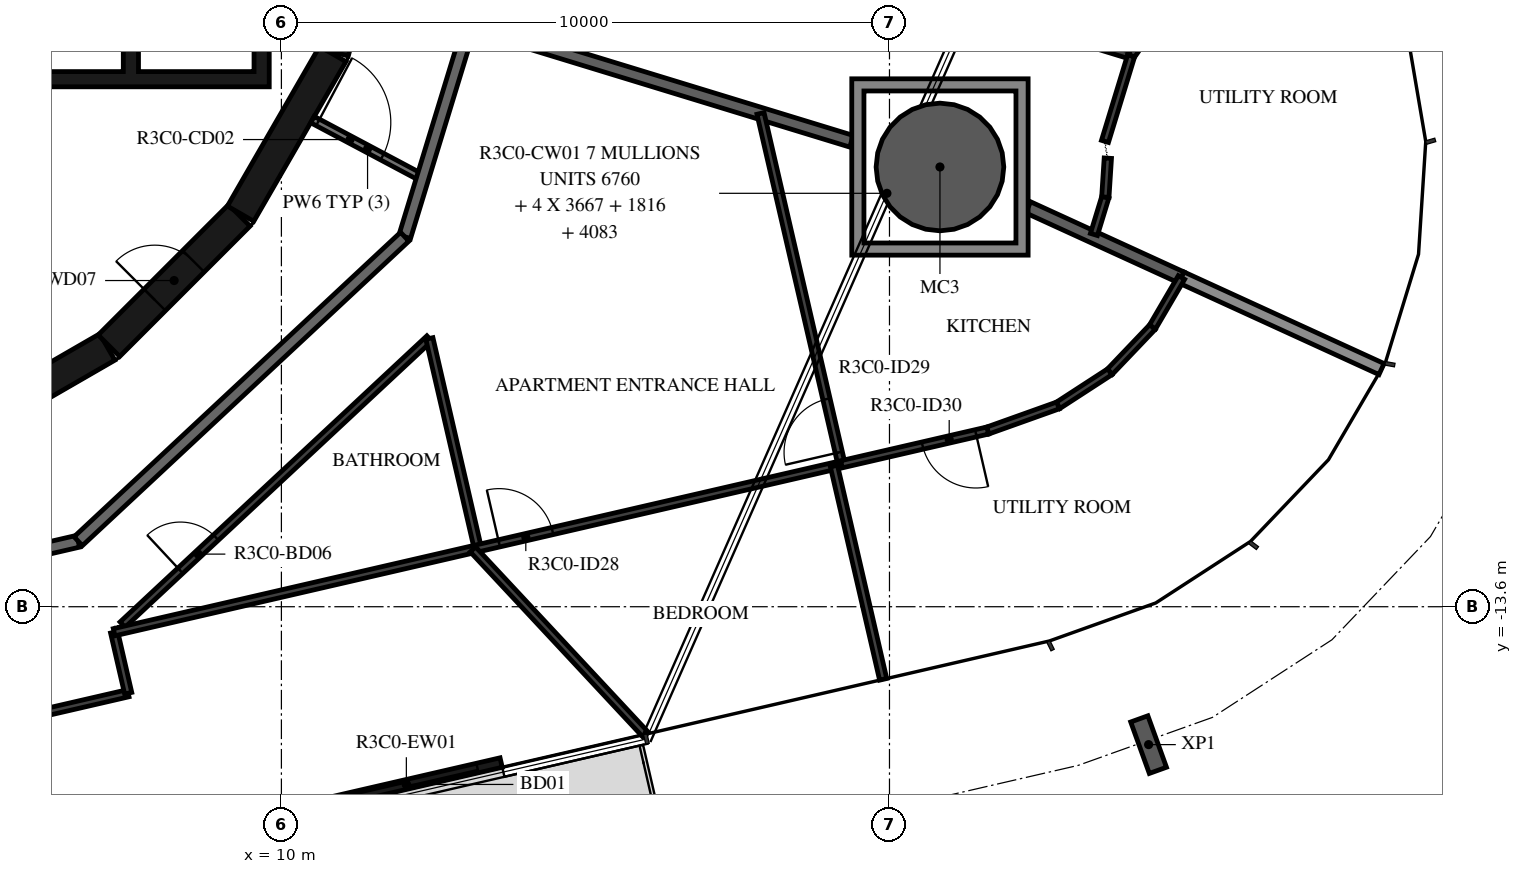
"""IFC4 building model, lengths in metres.
Left out: names, types, materials, properties, quantities, classifications, styles, units other than length and angle.
Written with IfcOpenShell. Run it as: python <this file> out.ifc"""

import sys

from ifc_helpers import new_model, si_unit, direction, frame, frame_2d, origin, origin_2d, place, context, subcontext, project, spatial, polyline, rectangle, hollow_circle, i_section, outline, extrude, element, fill, save


model = new_model("IFC4")
c1 = context("Model", 3, precision=1e-05, world=origin(), true_north=direction((0.0, 1.0)))
c2 = subcontext(c1, "Body", "Model", "MODEL_VIEW")
j1 = project(units=[si_unit("LENGTHUNIT", "METRE"), si_unit("PLANEANGLEUNIT", "RADIAN")], contexts=[c1])
p1 = place(None, origin())
s1 = spatial("IfcSite", under=j1, at=p1, CompositionType="ELEMENT")
p2 = place(p1, origin())
s2 = spatial("IfcBuilding", under=s1, at=p2, CompositionType="ELEMENT")
p3 = place(p2, frame((0.0, 0.0, 134.4)))
s3 = spatial("IfcBuildingStorey", under=s2, at=p3, CompositionType="ELEMENT", Elevation=134.4)
p4 = place(p3, frame((20.83, -6.368, -0.38), z_axis=(0.0, 0.0, 1.0), x_axis=(1.0, 0.0, 0.0)))
e1 = element("IfcColumn", 1, at=p4, inside=s3, PredefinedType="COLUMN", context=c2, shape_type="SweptSolid", body=[
    extrude(hollow_circle(Radius=1.05, WallThickness=0.05, at=origin_2d()), origin(), (0.0, 0.0, 1.0), 3.5),
])
p5 = place(p3, frame((24.261, -15.868, -0.38), z_axis=(0.0, 0.0, 1.0), x_axis=(-0.940523325903, -0.339729117728, 0.0)))
e2 = element("IfcColumn", 2, at=p5, inside=s3, PredefinedType="COLUMN", context=c2, shape_type="SweptSolid", body=[
    extrude(i_section(OverallWidth=0.3, OverallDepth=0.9, WebThickness=0.019, FlangeThickness=0.035, FilletRadius=0.03, at=origin_2d()), origin(), (0.0, 0.0, 1.0), 3.5),
])
p6 = place(p3, frame((10.496, -16.883, 0.0), z_axis=(0.0, 0.0, 1.0), x_axis=(0.974364187477, 0.224976510247, 0.0)))
e3 = element("IfcWall", 3, at=p6, inside=s3, PredefinedType="STANDARD", context=c2, shape_type="SweptSolid", body=[
    extrude(rectangle(XDim=3.2, YDim=0.16, at=frame_2d((1.6, 0.0))), origin(), (0.0, 0.0, 1.0), 3.12),
])
p7 = place(p6, frame((0.4, 0.0, 0.0)))
e4 = element("IfcOpeningElement", 4, at=p7, cuts=e3, PredefinedType="OPENING", context=c2, shape_type="SweptSolid", body=[
    extrude(rectangle(XDim=2.4, YDim=2.4, at=frame_2d((1.2, 1.2))), frame((0.0, 0.09, 0.0), z_axis=(0.0, -1.0, 0.0), x_axis=(1.0, 0.0, 0.0)), (0.0, 0.0, 1.0), 0.18),
])
p8 = place(p3, frame((4.51, -10.845, 0.0), z_axis=(0.0, 0.0, 1.0), x_axis=(0.865975092491, 0.500087131594, 0.0)))
e5 = element("IfcWall", 5, at=p8, inside=s3, PredefinedType="SHEAR", context=c2, shape_type="SweptSolid", body=[
    extrude(rectangle(XDim=3.033, YDim=0.5, at=frame_2d((1.516, 0.0))), origin(), (0.0, 0.0, 1.0), 3.12),
])
p9 = place(p3, frame((7.164, -9.308, 0.0), z_axis=(0.0, 0.0, 1.0), x_axis=(0.707106781187, 0.707106781187, 0.0)))
e6 = element("IfcWall", 6, at=p9, inside=s3, PredefinedType="SHEAR", context=c2, shape_type="SweptSolid", body=[
    extrude(rectangle(XDim=3.032, YDim=0.5, at=frame_2d((1.516, 0.0))), origin(), (0.0, 0.0, 1.0), 3.12),
])
p10 = place(p9, frame((1.066, 0.0, 0.0)))
e7 = element("IfcOpeningElement", 7, at=p10, cuts=e6, PredefinedType="OPENING", context=c2, shape_type="SweptSolid", body=[
    extrude(rectangle(XDim=0.9, YDim=2.1, at=frame_2d((0.45, 1.05))), frame((0.0, 0.26, 0.0), z_axis=(0.0, -1.0, 0.0), x_axis=(1.0, 0.0, 0.0)), (0.0, 0.0, 1.0), 0.52),
])
for number, where, z_axis, x_axis in (
    (8, (9.329, -7.137, 0.0), (0.0, 0.0, 1.0), (0.5, 0.866, 0.0)),
    (9, (10.858, -4.479, 0.0), (0.0, 0.0, 1.0), (0.259, 0.966, 0.0)),
):
    element("IfcWall", number, at=place(p3, frame(where, z_axis=z_axis, x_axis=x_axis)), inside=s3, PredefinedType="SHEAR", context=c2, shape_type="SweptSolid", body=[
        extrude(rectangle(XDim=3.033, YDim=0.5, at=frame_2d((1.516, 0.0))), origin(), (0.0, 0.0, 1.0), 3.12),
    ])
p11 = place(p3, origin())
e10 = element("IfcWall", 10, at=p11, inside=s3, PredefinedType="SHEAR", context=c2, shape_type="SweptSolid", body=[
    extrude(outline(polyline([(9.8, -5.05), (9.8, -4.8), (9.8, -1.9), (9.55, -1.9), (9.55, -4.8), (7.65, -4.8), (7.65, -1.9), (7.4, -1.9), (7.4, -4.8), (5.5, -4.8), (5.5, -1.9), (5.25, -1.9), (5.25, -4.8), (3.35, -4.8), (3.35, -1.9), (3.1, -1.9), (3.1, -4.8), (-5.25, -4.8), (-5.25, -1.9), (-5.5, -1.9), (-5.5, -4.8), (-7.4, -4.8), (-7.4, -1.9), (-7.65, -1.9), (-7.65, -4.8), (-9.55, -4.8), (-9.55, -1.9), (-9.8, -1.9), (-9.8, -4.8), (-9.8, -5.05), (9.8, -5.05)])), origin(), (0.0, 0.0, 1.0), 3.12),
])
p12 = place(p3, frame((10.511, -5.589, 0.0), z_axis=(0.0, 0.0, 1.0), x_axis=(0.882987820808, -0.469395897196, 0.0)))
e11 = element("IfcWall", 11, at=p12, inside=s3, PredefinedType="PARTITIONING", context=c2, shape_type="SweptSolid", body=[
    extrude(rectangle(XDim=2.052, YDim=0.12, at=frame_2d((1.026, 0.0))), origin(), (0.0, 0.0, 1.0), 3.12),
])
p13 = place(p12, frame((0.1, 0.0, 0.0)))
e12 = element("IfcOpeningElement", 12, at=p13, cuts=e11, PredefinedType="OPENING", context=c2, shape_type="SweptSolid", body=[
    extrude(rectangle(XDim=1.2, YDim=2.1, at=frame_2d((0.6, 1.05))), frame((0.0, 0.07, 0.0), z_axis=(0.0, -1.0, 0.0), x_axis=(1.0, 0.0, 0.0)), (0.0, 0.0, 1.0), 0.14),
])
p14 = place(p3, frame((12.028, -7.516, 0.0), z_axis=(0.0, 0.0, 1.0), x_axis=(0.292365533182, 0.956306642771, 0.0)))
e13 = element("IfcWall", 13, at=p14, inside=s3, PredefinedType="STANDARD", context=c2, shape_type="SweptSolid", body=[
    extrude(rectangle(XDim=7.342, YDim=0.2, at=frame_2d((3.671, 0.0))), origin(), (0.0, 0.0, 1.0), 3.12),
])
p15 = place(p3, frame((-0.495, -14.175, 0.0), z_axis=(0.0, 0.0, 1.0), x_axis=(0.974376622151, 0.224922649383, 0.0)))
e14 = element("IfcWall", 14, at=p15, inside=s3, PredefinedType="STANDARD", context=c2, shape_type="SweptSolid", body=[
    extrude(rectangle(XDim=7.342, YDim=0.2, at=frame_2d((3.671, 0.0))), origin(), (0.0, 0.0, 1.0), 3.12),
])
p16 = place(p15, frame((0.2, 0.0, 0.0)))
e15 = element("IfcOpeningElement", 15, at=p16, cuts=e14, PredefinedType="OPENING", context=c2, shape_type="SweptSolid", body=[
    extrude(rectangle(XDim=1.0, YDim=2.1, at=frame_2d((0.5, 1.05))), frame((0.0, 0.11, 0.0), z_axis=(0.0, -1.0, 0.0), x_axis=(1.0, 0.0, 0.0)), (0.0, 0.0, 1.0), 0.22),
])
p17 = place(p3, frame((6.659, -12.523, 0.0), z_axis=(0.0, 0.0, 1.0), x_axis=(0.731350455479, 0.682001841105, 0.0)))
e16 = element("IfcWall", 16, at=p17, inside=s3, PredefinedType="STANDARD", context=c2, shape_type="SweptSolid", body=[
    extrude(rectangle(XDim=7.342, YDim=0.2, at=frame_2d((3.671, 0.0))), origin(), (0.0, 0.0, 1.0), 3.12),
])
p18 = place(p3, frame((13.095, -4.026, 0.0), z_axis=(0.0, 0.0, 1.0), x_axis=(0.956303942966, -0.292374363904, 0.0)))
e17 = element("IfcWall", 17, at=p18, inside=s3, PredefinedType="STANDARD", context=c2, shape_type="SweptSolid", body=[
    extrude(rectangle(XDim=6.567, YDim=0.2, at=frame_2d((3.284, 0.0))), origin(), (0.0, 0.0, 1.0), 3.12),
])
p19 = place(p3, frame((22.28, -7.032, 0.0), z_axis=(0.0, 0.0, 1.0), x_axis=(0.909302252994, -0.416136291016, 0.0)))
e18 = element("IfcWall", 18, at=p19, inside=s3, PredefinedType="STANDARD", context=c2, shape_type="SweptSolid", body=[
    extrude(rectangle(XDim=2.773, YDim=0.2, at=frame_2d((1.387, 0.0))), origin(), (0.0, 0.0, 1.0), 3.12),
])
p20 = place(p3, frame((24.802, -8.186, 0.0), z_axis=(0.0, 0.0, 1.0), x_axis=(0.909307466213, -0.416124899387, 0.0)))
e19 = element("IfcWall", 19, at=p20, inside=s3, PredefinedType="STANDARD", context=c2, shape_type="SweptSolid", body=[
    extrude(rectangle(XDim=3.618, YDim=0.2, at=frame_2d((1.809, 0.0))), origin(), (0.0, 0.0, 1.0), 2.73),
])
p21 = place(p3, frame((23.975, -4.537, 0.0), z_axis=(0.0, 0.0, 1.0), x_axis=(-0.956300480156, 0.292385689892, 0.0)))
e20 = element("IfcWall", 20, at=p21, inside=s3, PredefinedType="PARTITIONING", context=c2, shape_type="SweptSolid", body=[
    extrude(rectangle(XDim=9.054, YDim=0.12, at=frame_2d((4.527, 0.0))), origin(), (0.0, 0.0, 1.0), 3.12),
])
p22 = place(p21, frame((2.998, 0.0, 0.0)))
e21 = element("IfcOpeningElement", 21, at=p22, cuts=e20, PredefinedType="OPENING", context=c2, shape_type="SweptSolid", body=[
    extrude(rectangle(XDim=0.8, YDim=2.1, at=frame_2d((0.4, 1.05))), frame((0.0, 0.07, 0.0), z_axis=(0.0, -1.0, 0.0), x_axis=(1.0, 0.0, 0.0)), (0.0, 0.0, 1.0), 0.14),
])
for number, where, z_axis, x_axis in (
    (22, (23.362, -7.478, 0.0), (0.0, 0.0, 1.0), (0.293, 0.956, 0.0)),
    (23, (23.55, -6.864, 0.0), (0.0, 0.0, 1.0), (0.064, 0.998, 0.0)),
):
    element("IfcWall", number, at=place(p3, frame(where, z_axis=z_axis, x_axis=x_axis)), inside=s3, PredefinedType="PARTITIONING", context=c2, shape_type="SweptSolid", body=[
        extrude(rectangle(XDim=0.642, YDim=0.12, at=frame_2d((0.321, 0.0))), origin(), (0.0, 0.0, 1.0), 3.12),
    ])
p23 = place(p3, frame((23.544, -5.948, 0.0), z_axis=(0.0, 0.0, 1.0), x_axis=(0.292386782861, 0.956300145983, 0.0)))
e24 = element("IfcWall", 24, at=p23, inside=s3, PredefinedType="PARTITIONING", context=c2, shape_type="SweptSolid", body=[
    extrude(rectangle(XDim=1.475, YDim=0.12, at=frame_2d((0.737, 0.0))), origin(), (0.0, 0.0, 1.0), 3.12),
])
p24 = place(p3, frame((26.593, -0.818, 0.0), z_axis=(0.0, 0.0, 1.0), x_axis=(-0.575629018128, -0.817710971853, 0.0)))
e25 = element("IfcWall", 25, at=p24, inside=s3, PredefinedType="PARTITIONING", context=c2, shape_type="SweptSolid", body=[
    extrude(rectangle(XDim=4.548, YDim=0.12, at=frame_2d((2.274, 0.0))), origin(), (0.0, 0.0, 1.0), 3.12),
])
p25 = place(p24, frame((0.2, 0.0, 0.0)))
e26 = element("IfcOpeningElement", 26, at=p25, cuts=e25, PredefinedType="OPENING", context=c2, shape_type="SweptSolid", body=[
    extrude(rectangle(XDim=0.9, YDim=2.1, at=frame_2d((0.45, 1.05))), frame((0.0, 0.07, 0.0), z_axis=(0.0, -1.0, 0.0), x_axis=(1.0, 0.0, 0.0)), (0.0, 0.0, 1.0), 0.14),
])
p26 = place(p3, frame((4.265, -15.765, 0.0), z_axis=(0.0, 0.0, 1.0), x_axis=(0.974382467056, 0.22489732745, 0.0)))
e27 = element("IfcWall", 27, at=p26, inside=s3, PredefinedType="PARTITIONING", context=c2, shape_type="SweptSolid", body=[
    extrude(rectangle(XDim=3.3, YDim=0.12, at=frame_2d((1.65, 0.0))), origin(), (0.0, 0.0, 1.0), 3.12),
])
p27 = place(p3, frame((7.481, -15.022, 0.0), z_axis=(0.0, 0.0, 1.0), x_axis=(-0.225084689316, 0.974339203068, 0.0)))
e28 = element("IfcWall", 28, at=p27, inside=s3, PredefinedType="PARTITIONING", context=c2, shape_type="SweptSolid", body=[
    extrude(rectangle(XDim=1.029, YDim=0.12, at=frame_2d((0.515, 0.0))), origin(), (0.0, 0.0, 1.0), 3.12),
])
p28 = place(p3, frame((7.388, -13.894, 0.0), z_axis=(0.0, 0.0, 1.0), x_axis=(0.731339966659, 0.682013088707, 0.0)))
e29 = element("IfcWall", 29, at=p28, inside=s3, PredefinedType="PARTITIONING", context=c2, shape_type="SweptSolid", body=[
    extrude(rectangle(XDim=6.899, YDim=0.12, at=frame_2d((3.45, 0.0))), origin(), (0.0, 0.0, 1.0), 3.12),
])
p29 = place(p28, frame((1.3, 0.0, 0.0)))
e30 = element("IfcOpeningElement", 30, at=p29, cuts=e29, PredefinedType="OPENING", context=c2, shape_type="SweptSolid", body=[
    extrude(rectangle(XDim=0.8, YDim=2.1, at=frame_2d((0.4, 1.05))), frame((0.0, 0.07, 0.0), z_axis=(0.0, -1.0, 0.0), x_axis=(1.0, 0.0, 0.0)), (0.0, 0.0, 1.0), 0.14),
])
p30 = place(p3, frame((12.434, -9.189, 0.0), z_axis=(0.0, 0.0, 1.0), x_axis=(0.224924972887, -0.974376085796, 0.0)))
e31 = element("IfcWall", 31, at=p30, inside=s3, PredefinedType="PARTITIONING", context=c2, shape_type="SweptSolid", body=[
    extrude(rectangle(XDim=3.541, YDim=0.12, at=frame_2d((1.771, 0.0))), origin(), (0.0, 0.0, 1.0), 3.12),
])
p31 = place(p3, frame((7.249, -14.02, 0.0), z_axis=(0.0, 0.0, 1.0), x_axis=(0.974369514697, 0.224953437023, 0.0)))
e32 = element("IfcWall", 32, at=p31, inside=s3, PredefinedType="PARTITIONING", context=c2, shape_type="SweptSolid", body=[
    extrude(rectangle(XDim=12.149, YDim=0.12, at=frame_2d((6.074, 0.0))), origin(), (0.0, 0.0, 1.0), 3.12),
])
p32 = place(p31, frame((6.498, 0.0, 0.0)))
e33 = element("IfcOpeningElement", 33, at=p32, cuts=e32, PredefinedType="OPENING", context=c2, shape_type="SweptSolid", body=[
    extrude(rectangle(XDim=0.9, YDim=2.1, at=frame_2d((0.45, 1.05))), frame((0.0, 0.07, 0.0), z_axis=(0.0, -1.0, 0.0), x_axis=(1.0, 0.0, 0.0)), (0.0, 0.0, 1.0), 0.14),
])
p33 = place(p3, frame((19.211, -11.258, 0.0), z_axis=(0.0, 0.0, 1.0), x_axis=(-0.22499500936, 0.974359915926, 0.0)))
e34 = element("IfcWall", 34, at=p33, inside=s3, PredefinedType="PARTITIONING", context=c2, shape_type="SweptSolid", body=[
    extrude(rectangle(XDim=5.921, YDim=0.12, at=frame_2d((2.961, 0.0))), origin(), (0.0, 0.0, 1.0), 3.12),
])
p34 = place(p33, frame((0.2, 0.0, 0.0)))
e35 = element("IfcOpeningElement", 35, at=p34, cuts=e34, PredefinedType="OPENING", context=c2, shape_type="SweptSolid", body=[
    extrude(rectangle(XDim=0.9, YDim=2.1, at=frame_2d((0.45, 1.05))), frame((0.0, 0.07, 0.0), z_axis=(0.0, -1.0, 0.0), x_axis=(1.0, 0.0, 0.0)), (0.0, 0.0, 1.0), 0.14),
])
p35 = place(p3, frame((15.985, -15.698, 0.0), z_axis=(0.0, 0.0, 1.0), x_axis=(-0.681979185924, 0.731371581322, 0.0)))
e36 = element("IfcWall", 36, at=p35, inside=s3, PredefinedType="PARTITIONING", context=c2, shape_type="SweptSolid", body=[
    extrude(rectangle(XDim=4.157, YDim=0.12, at=frame_2d((2.079, 0.0))), origin(), (0.0, 0.0, 1.0), 3.12),
])
p36 = place(p3, frame((19.896, -14.794, 0.0), z_axis=(0.0, 0.0, 1.0), x_axis=(-0.224958568294, 0.974368330023, 0.0)))
e37 = element("IfcWall", 37, at=p36, inside=s3, PredefinedType="PARTITIONING", context=c2, shape_type="SweptSolid", body=[
    extrude(rectangle(XDim=3.6, YDim=0.12, at=frame_2d((1.8, 0.0))), origin(), (0.0, 0.0, 1.0), 3.12),
])
p37 = place(p3, frame((24.802, -8.186, 0.0), z_axis=(0.0, 0.0, 1.0), x_axis=(-0.505043103481, -0.863094122113, 0.0)))
e38 = element("IfcWall", 38, at=p37, inside=s3, PredefinedType="PARTITIONING", context=c2, shape_type="SweptSolid", body=[
    extrude(rectangle(XDim=0.945, YDim=0.12, at=frame_2d((0.473, 0.0))), origin(), (0.0, 0.0, 1.0), 3.12),
])
for number, where, z_axis, x_axis in (
    (39, (24.324, -9.002, 0.0), (0.0, 0.0, 1.0), (-0.69, -0.723, 0.0)),
    (40, (23.623, -9.737, 0.0), (0.0, 0.0, 1.0), (-0.839, -0.545, 0.0)),
):
    element("IfcWall", number, at=place(p3, frame(where, z_axis=z_axis, x_axis=x_axis)), inside=s3, PredefinedType="PARTITIONING", context=c2, shape_type="SweptSolid", body=[
        extrude(rectangle(XDim=1.016, YDim=0.12, at=frame_2d((0.508, 0.0))), origin(), (0.0, 0.0, 1.0), 3.12),
    ])
p38 = place(p3, frame((22.771, -10.29, 0.0), z_axis=(0.0, 0.0, 1.0), x_axis=(-0.941701391526, -0.336449831623, 0.0)))
e41 = element("IfcWall", 41, at=p38, inside=s3, PredefinedType="PARTITIONING", context=c2, shape_type="SweptSolid", body=[
    extrude(rectangle(XDim=1.227, YDim=0.12, at=frame_2d((0.614, 0.0))), origin(), (0.0, 0.0, 1.0), 3.12),
])
p39 = place(p3, frame((21.615, -10.703, 0.0), z_axis=(0.0, 0.0, 1.0), x_axis=(-0.974361171506, -0.224989571893, 0.0)))
e42 = element("IfcWall", 42, at=p39, inside=s3, PredefinedType="PARTITIONING", context=c2, shape_type="SweptSolid", body=[
    extrude(rectangle(XDim=2.468, YDim=0.12, at=frame_2d((1.234, 0.0))), origin(), (0.0, 0.0, 1.0), 3.12),
])
p40 = place(p39, frame((0.2, 0.0, 0.0)))
e43 = element("IfcOpeningElement", 43, at=p40, cuts=e42, PredefinedType="OPENING", context=c2, shape_type="SweptSolid", body=[
    extrude(rectangle(XDim=0.9, YDim=2.1, at=frame_2d((0.45, 1.05))), frame((0.0, 0.07, 0.0), z_axis=(0.0, -1.0, 0.0), x_axis=(1.0, 0.0, 0.0)), (0.0, 0.0, 1.0), 0.14),
])
p41 = place(p3, origin())
e44 = element("IfcWall", 44, at=p41, inside=s3, PredefinedType="STANDARD", context=c2, shape_type="SweptSolid", body=[
    extrude(outline(polyline([(22.28, -4.918), (22.28, -7.818), (19.38, -7.818), (19.38, -4.918), (22.28, -4.918)]), holes=[polyline([(19.58, -7.618), (22.08, -7.618), (22.08, -5.118), (19.58, -5.118), (19.58, -7.618)])]), origin(), (0.0, 0.0, 1.0), 3.12),
])
p42 = place(p7, origin())
e45 = element("IfcDoor", 45, at=p42, inside=s3, OperationType="DOUBLE_DOOR_SLIDING", PredefinedType="DOOR", context=c2, shape_type="SweptSolid", body=[
    extrude(rectangle(XDim=2.4, YDim=2.4, at=frame_2d((1.2, 1.2))), frame((0.0, 0.025, 0.0), z_axis=(0.0, -1.0, 0.0), x_axis=(1.0, 0.0, 0.0)), (0.0, 0.0, 1.0), 0.05),
])
fill(e4, e45)
p43 = place(p10, origin())
e46 = element("IfcDoor", 46, at=p43, inside=s3, OperationType="SINGLE_SWING_RIGHT", PredefinedType="DOOR", context=c2, shape_type="SweptSolid", body=[
    extrude(rectangle(XDim=0.9, YDim=2.1, at=frame_2d((0.45, 1.05))), frame((0.0, 0.025, 0.0), z_axis=(0.0, -1.0, 0.0), x_axis=(1.0, 0.0, 0.0)), (0.0, 0.0, 1.0), 0.05),
])
fill(e7, e46)
p44 = place(p29, origin())
e47 = element("IfcDoor", 47, at=p44, inside=s3, OperationType="SINGLE_SWING_RIGHT", PredefinedType="DOOR", context=c2, shape_type="SweptSolid", body=[
    extrude(rectangle(XDim=0.8, YDim=2.1, at=frame_2d((0.4, 1.05))), frame((0.0, 0.025, 0.0), z_axis=(0.0, -1.0, 0.0), x_axis=(1.0, 0.0, 0.0)), (0.0, 0.0, 1.0), 0.05),
])
fill(e30, e47)
p45 = place(p32, origin())
e48 = element("IfcDoor", 48, at=p45, inside=s3, OperationType="SINGLE_SWING_RIGHT", PredefinedType="DOOR", context=c2, shape_type="SweptSolid", body=[
    extrude(rectangle(XDim=0.9, YDim=2.1, at=frame_2d((0.45, 1.05))), frame((0.0, 0.025, 0.0), z_axis=(0.0, -1.0, 0.0), x_axis=(1.0, 0.0, 0.0)), (0.0, 0.0, 1.0), 0.05),
])
fill(e33, e48)
p46 = place(p34, origin())
e49 = element("IfcDoor", 49, at=p46, inside=s3, OperationType="SINGLE_SWING_RIGHT", PredefinedType="DOOR", context=c2, shape_type="SweptSolid", body=[
    extrude(rectangle(XDim=0.9, YDim=2.1, at=frame_2d((0.45, 1.05))), frame((0.0, 0.025, 0.0), z_axis=(0.0, -1.0, 0.0), x_axis=(1.0, 0.0, 0.0)), (0.0, 0.0, 1.0), 0.05),
])
fill(e35, e49)
p47 = place(p40, origin())
e50 = element("IfcDoor", 50, at=p47, inside=s3, OperationType="SINGLE_SWING_RIGHT", PredefinedType="DOOR", context=c2, shape_type="SweptSolid", body=[
    extrude(rectangle(XDim=0.9, YDim=2.1, at=frame_2d((0.45, 1.05))), frame((0.0, 0.025, 0.0), z_axis=(0.0, -1.0, 0.0), x_axis=(1.0, 0.0, 0.0)), (0.0, 0.0, 1.0), 0.05),
])
fill(e43, e50)
p48 = place(p13, origin())
e51 = element("IfcDoor", 51, at=p48, inside=s3, OperationType="DOUBLE_DOOR_SINGLE_SWING", PredefinedType="DOOR", context=c2, shape_type="SweptSolid", body=[
    extrude(rectangle(XDim=1.2, YDim=2.1, at=frame_2d((0.6, 1.05))), frame((0.0, 0.025, 0.0), z_axis=(0.0, -1.0, 0.0), x_axis=(1.0, 0.0, 0.0)), (0.0, 0.0, 1.0), 0.05),
])
fill(e12, e51)
save(model, sys.argv[1])
